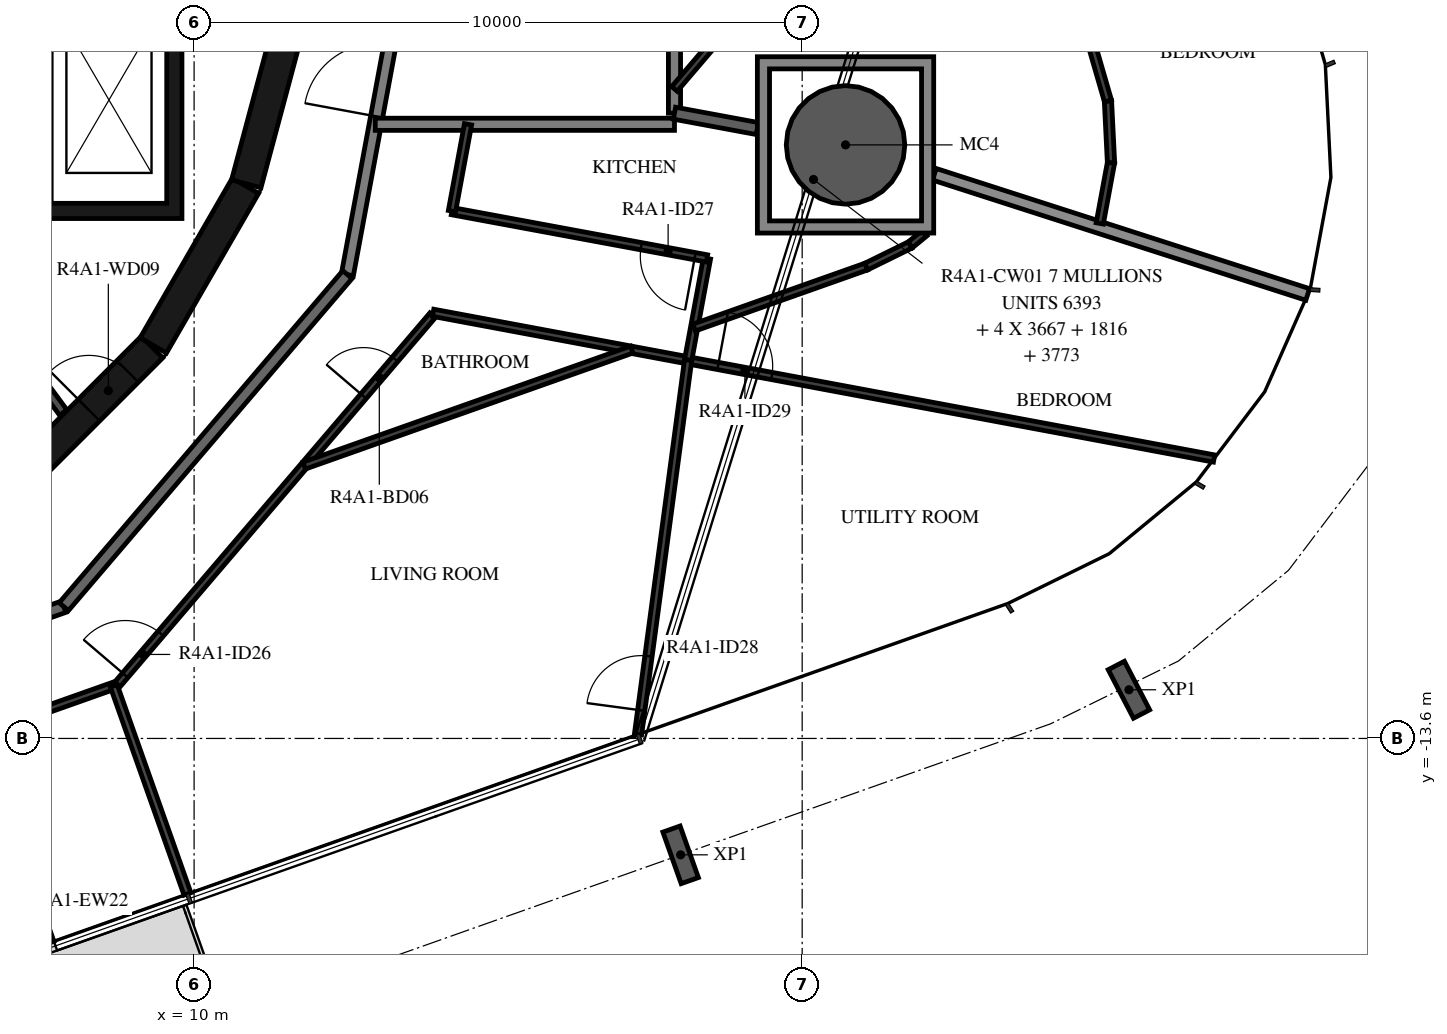
"""IFC4 building model, lengths in metres.
Left out: names, types, materials, properties, quantities, classifications, styles, units other than length and angle.
Written with IfcOpenShell. Run it as: python <this file> out.ifc"""

import sys

from ifc_helpers import new_model, si_unit, direction, frame, frame_2d, origin, origin_2d, place, context, subcontext, project, spatial, polyline, rectangle, hollow_circle, i_section, outline, extrude, element, fill, save


model = new_model("IFC4")
c1 = context("Model", 3, precision=1e-05, world=origin(), true_north=direction((0.0, 1.0)))
c2 = subcontext(c1, "Body", "Model", "MODEL_VIEW")
j1 = project(units=[si_unit("LENGTHUNIT", "METRE"), si_unit("PLANEANGLEUNIT", "RADIAN")], contexts=[c1])
p1 = place(None, origin())
s1 = spatial("IfcSite", under=j1, at=p1, CompositionType="ELEMENT")
p2 = place(p1, origin())
s2 = spatial("IfcBuilding", under=s1, at=p2, CompositionType="ELEMENT")
p3 = place(p2, frame((0.0, 0.0, 155.2)))
s3 = spatial("IfcBuildingStorey", under=s2, at=p3, CompositionType="ELEMENT", Elevation=155.2)
p4 = place(p3, frame((20.713, -3.839, -0.38), z_axis=(0.0, 0.0, 1.0), x_axis=(1.0, 0.0, 0.0)))
e1 = element("IfcColumn", 1, at=p4, inside=s3, PredefinedType="COLUMN", context=c2, shape_type="SweptSolid", body=[
    extrude(hollow_circle(Radius=0.975, WallThickness=0.045, at=origin_2d()), origin(), (0.0, 0.0, 1.0), 3.5),
])
for number, where, z_axis, x_axis in (
    (2, (18.001, -15.514, -0.38), (0.0, 0.0, 1.0), (-0.943, -0.334, 0.0)),
    (3, (25.374, -12.799, -0.38), (0.0, 0.0, 1.0), (-0.887, -0.461, 0.0)),
):
    element("IfcColumn", number, at=place(p3, frame(where, z_axis=z_axis, x_axis=x_axis)), inside=s3, PredefinedType="COLUMN", context=c2, shape_type="SweptSolid", body=[
        extrude(i_section(OverallWidth=0.3, OverallDepth=0.9, WebThickness=0.019, FlangeThickness=0.035, FilletRadius=0.03, at=origin_2d()), origin(), (0.0, 0.0, 1.0), 3.5),
    ])
p5 = place(p3, frame((4.652, -17.929, 0.0), z_axis=(0.0, 0.0, 1.0), x_axis=(0.942620722428, 0.333865502335, 0.0)))
e4 = element("IfcWall", 4, at=p5, inside=s3, PredefinedType="STANDARD", context=c2, shape_type="SweptSolid", body=[
    extrude(rectangle(XDim=3.2, YDim=0.16, at=frame_2d((1.6, 0.0))), origin(), (0.0, 0.0, 1.0), 3.12),
])
p6 = place(p5, frame((0.4, 0.0, 0.0)))
e5 = element("IfcOpeningElement", 5, at=p6, cuts=e4, PredefinedType="OPENING", context=c2, shape_type="SweptSolid", body=[
    extrude(rectangle(XDim=2.4, YDim=2.4, at=frame_2d((1.2, 1.2))), frame((0.0, 0.09, 0.0), z_axis=(0.0, -1.0, 0.0), x_axis=(1.0, 0.0, 0.0)), (0.0, 0.0, 1.0), 0.18),
])
p7 = place(p3, frame((7.164, -9.308, 0.0), z_axis=(0.0, 0.0, 1.0), x_axis=(0.707106781187, 0.707106781187, 0.0)))
e6 = element("IfcWall", 6, at=p7, inside=s3, PredefinedType="SHEAR", context=c2, shape_type="SweptSolid", body=[
    extrude(rectangle(XDim=3.032, YDim=0.5, at=frame_2d((1.516, 0.0))), origin(), (0.0, 0.0, 1.0), 3.12),
])
p8 = place(p7, frame((1.566, 0.0, 0.0)))
e7 = element("IfcOpeningElement", 7, at=p8, cuts=e6, PredefinedType="OPENING", context=c2, shape_type="SweptSolid", body=[
    extrude(rectangle(XDim=0.9, YDim=2.1, at=frame_2d((0.45, 1.05))), frame((0.0, 0.26, 0.0), z_axis=(0.0, -1.0, 0.0), x_axis=(1.0, 0.0, 0.0)), (0.0, 0.0, 1.0), 0.52),
])
for number, where, z_axis, x_axis in (
    (8, (9.329, -7.137, 0.0), (0.0, 0.0, 1.0), (0.5, 0.866, 0.0)),
    (9, (10.858, -4.479, 0.0), (0.0, 0.0, 1.0), (0.259, 0.966, 0.0)),
):
    element("IfcWall", number, at=place(p3, frame(where, z_axis=z_axis, x_axis=x_axis)), inside=s3, PredefinedType="SHEAR", context=c2, shape_type="SweptSolid", body=[
        extrude(rectangle(XDim=3.033, YDim=0.5, at=frame_2d((1.516, 0.0))), origin(), (0.0, 0.0, 1.0), 3.12),
    ])
p9 = place(p3, origin())
e10 = element("IfcWall", 10, at=p9, inside=s3, PredefinedType="SHEAR", context=c2, shape_type="SweptSolid", body=[
    extrude(outline(polyline([(9.8, -5.05), (9.8, -4.8), (9.8, -1.9), (9.55, -1.9), (9.55, -4.8), (7.65, -4.8), (7.65, -1.9), (7.4, -1.9), (7.4, -4.8), (5.5, -4.8), (5.5, -1.9), (5.25, -1.9), (5.25, -4.8), (3.35, -4.8), (3.35, -1.9), (3.1, -1.9), (3.1, -4.8), (1.2, -4.8), (1.2, -1.9), (0.95, -1.9), (0.95, -4.8), (-0.95, -4.8), (-0.95, -1.9), (-1.2, -1.9), (-1.2, -4.8), (-3.1, -4.8), (-3.1, -1.9), (-3.35, -1.9), (-3.35, -4.8), (-5.25, -4.8), (-5.25, -1.9), (-5.5, -1.9), (-5.5, -4.8), (-7.4, -4.8), (-7.4, -1.9), (-7.65, -1.9), (-7.65, -4.8), (-9.55, -4.8), (-9.55, -1.9), (-9.8, -1.9), (-9.8, -4.8), (-9.8, -5.05), (9.8, -5.05)])), origin(), (0.0, 0.0, 1.0), 3.12),
])
p10 = place(p3, frame((5.528, -5.098, 0.0), z_axis=(0.0, 0.0, 1.0), x_axis=(0.594034318069, -0.804439698769, 0.0)))
e11 = element("IfcWall", 11, at=p10, inside=s3, PredefinedType="PARTITIONING", context=c2, shape_type="SweptSolid", body=[
    extrude(rectangle(XDim=3.907, YDim=0.15, at=frame_2d((1.953, 0.0))), origin(), (0.0, 0.0, 1.0), 3.12),
])
p11 = place(p3, frame((12.521, -5.972, 0.0), z_axis=(0.0, 0.0, 1.0), x_axis=(0.182244189886, 0.983253301674, 0.0)))
e12 = element("IfcWall", 12, at=p11, inside=s3, PredefinedType="STANDARD", context=c2, shape_type="SweptSolid", body=[
    extrude(rectangle(XDim=4.176, YDim=0.2, at=frame_2d((2.088, 0.0))), origin(), (0.0, 0.0, 1.0), 3.12),
])
p12 = place(p11, frame((2.645, 0.0, 0.0)))
e13 = element("IfcOpeningElement", 13, at=p12, cuts=e12, PredefinedType="OPENING", context=c2, shape_type="SweptSolid", body=[
    extrude(rectangle(XDim=1.2, YDim=2.1, at=frame_2d((0.6, 1.05))), frame((0.0, 0.11, 0.0), z_axis=(0.0, -1.0, 0.0), x_axis=(1.0, 0.0, 0.0)), (0.0, 0.0, 1.0), 0.22),
])
p13 = place(p3, frame((1.088, -13.83, 0.0), z_axis=(0.0, 0.0, 1.0), x_axis=(0.942648397945, 0.333787354241, 0.0)))
e14 = element("IfcWall", 14, at=p13, inside=s3, PredefinedType="STANDARD", context=c2, shape_type="SweptSolid", body=[
    extrude(rectangle(XDim=7.181, YDim=0.2, at=frame_2d((3.591, 0.0))), origin(), (0.0, 0.0, 1.0), 3.12),
])
p14 = place(p13, frame((0.2, 0.0, 0.0)))
e15 = element("IfcOpeningElement", 15, at=p14, cuts=e14, PredefinedType="OPENING", context=c2, shape_type="SweptSolid", body=[
    extrude(rectangle(XDim=1.0, YDim=2.1, at=frame_2d((0.5, 1.05))), frame((0.0, 0.11, 0.0), z_axis=(0.0, -1.0, 0.0), x_axis=(1.0, 0.0, 0.0)), (0.0, 0.0, 1.0), 0.22),
])
p15 = place(p3, frame((7.858, -11.433, 0.0), z_axis=(0.0, 0.0, 1.0), x_axis=(0.649440801937, 0.760412154545, 0.0)))
e16 = element("IfcWall", 16, at=p15, inside=s3, PredefinedType="STANDARD", context=c2, shape_type="SweptSolid", body=[
    extrude(rectangle(XDim=7.181, YDim=0.2, at=frame_2d((3.59, 0.0))), origin(), (0.0, 0.0, 1.0), 3.12),
])
p16 = place(p3, frame((17.9, -3.318, 0.0), z_axis=(0.0, 0.0, 1.0), x_axis=(0.0, 1.0, 0.0)))
e17 = element("IfcWall", 17, at=p16, inside=s3, PredefinedType="STANDARD", context=c2, shape_type="SweptSolid", body=[
    extrude(rectangle(XDim=6.818, YDim=0.2, at=frame_2d((3.409, 0.0))), origin(), (0.0, 0.0, 1.0), 3.12),
])
p17 = place(p3, frame((12.979, -3.5, 0.0), z_axis=(0.0, 0.0, 1.0), x_axis=(1.0, 0.0, 0.0)))
e18 = element("IfcWall", 18, at=p17, inside=s3, PredefinedType="STANDARD", context=c2, shape_type="SweptSolid", body=[
    extrude(rectangle(XDim=4.92, YDim=0.2, at=frame_2d((2.46, 0.0))), origin(), (0.0, 0.0, 1.0), 3.12),
])
p18 = place(p3, frame((22.173, -4.322, 0.0), z_axis=(0.0, 0.0, 1.0), x_axis=(0.951906405572, -0.306388960362, 0.0)))
e19 = element("IfcWall", 19, at=p18, inside=s3, PredefinedType="STANDARD", context=c2, shape_type="SweptSolid", body=[
    extrude(rectangle(XDim=6.45, YDim=0.2, at=frame_2d((3.225, 0.0))), origin(), (0.0, 0.0, 1.0), 2.73),
])
p19 = place(p3, frame((17.9, -3.318, 0.0), z_axis=(0.0, 0.0, 1.0), x_axis=(0.983252800712, -0.182246892682, 0.0)))
e20 = element("IfcWall", 20, at=p19, inside=s3, PredefinedType="STANDARD", context=c2, shape_type="SweptSolid", body=[
    extrude(rectangle(XDim=1.386, YDim=0.2, at=frame_2d((0.693, 0.0))), origin(), (0.0, 0.0, 1.0), 3.12),
])
p20 = place(p3, frame((17.9, -2.918, 0.0), z_axis=(0.0, 0.0, 1.0), x_axis=(0.649469887983, 0.760387312232, 0.0)))
e21 = element("IfcWall", 21, at=p20, inside=s3, PredefinedType="PARTITIONING", context=c2, shape_type="SweptSolid", body=[
    extrude(rectangle(XDim=5.527, YDim=0.12, at=frame_2d((2.763, 0.0))), origin(), (0.0, 0.0, 1.0), 3.12),
])
p21 = place(p20, frame((1.7, 0.0, 0.0)))
e22 = element("IfcOpeningElement", 22, at=p21, cuts=e21, PredefinedType="OPENING", context=c2, shape_type="SweptSolid", body=[
    extrude(rectangle(XDim=0.9, YDim=2.1, at=frame_2d((0.45, 1.05))), frame((0.0, 0.07, 0.0), z_axis=(0.0, -1.0, 0.0), x_axis=(1.0, 0.0, 0.0)), (0.0, 0.0, 1.0), 0.14),
])
for number, where, z_axis, x_axis in (
    (23, (24.894, -5.131, 0.0), (0.0, 0.0, 1.0), (0.182, 0.983, 0.0)),
    (24, (25.079, -4.132, 0.0), (0.0, 0.0, 1.0), (-0.049, 0.999, 0.0)),
):
    element("IfcWall", number, at=place(p3, frame(where, z_axis=z_axis, x_axis=x_axis)), inside=s3, PredefinedType="PARTITIONING", context=c2, shape_type="SweptSolid", body=[
        extrude(rectangle(XDim=1.016, YDim=0.12, at=frame_2d((0.508, 0.0))), origin(), (0.0, 0.0, 1.0), 3.12),
    ])
p22 = place(p3, frame((25.029, -3.117, 0.0), z_axis=(0.0, 0.0, 1.0), x_axis=(-0.278559922069, 0.96041885124, 0.0)))
e25 = element("IfcWall", 25, at=p22, inside=s3, PredefinedType="PARTITIONING", context=c2, shape_type="SweptSolid", body=[
    extrude(rectangle(XDim=1.016, YDim=0.12, at=frame_2d((0.508, 0.0))), origin(), (0.0, 0.0, 1.0), 3.12),
])
p23 = place(p3, frame((1.269, -15.357, 0.0), z_axis=(0.0, 0.0, 1.0), x_axis=(0.942639442898, 0.333812643101, 0.0)))
e26 = element("IfcWall", 26, at=p23, inside=s3, PredefinedType="PARTITIONING", context=c2, shape_type="SweptSolid", body=[
    extrude(rectangle(XDim=7.86, YDim=0.12, at=frame_2d((3.93, 0.0))), origin(), (0.0, 0.0, 1.0), 3.12),
])
p24 = place(p23, frame((0.2, 0.0, 0.0)))
e27 = element("IfcOpeningElement", 27, at=p24, cuts=e26, PredefinedType="OPENING", context=c2, shape_type="SweptSolid", body=[
    extrude(rectangle(XDim=0.9, YDim=2.1, at=frame_2d((0.45, 1.05))), frame((0.0, 0.07, 0.0), z_axis=(0.0, -1.0, 0.0), x_axis=(1.0, 0.0, 0.0)), (0.0, 0.0, 1.0), 0.14),
])
p25 = place(p3, frame((8.737, -12.713, 0.0), z_axis=(0.0, 0.0, 1.0), x_axis=(0.649430604754, 0.760420863476, 0.0)))
e28 = element("IfcWall", 28, at=p25, inside=s3, PredefinedType="PARTITIONING", context=c2, shape_type="SweptSolid", body=[
    extrude(rectangle(XDim=7.985, YDim=0.12, at=frame_2d((3.992, 0.0))), origin(), (0.0, 0.0, 1.0), 3.12),
])
p26 = place(p25, frame((0.2, 0.0, 0.0)))
e29 = element("IfcOpeningElement", 29, at=p26, cuts=e28, PredefinedType="OPENING", context=c2, shape_type="SweptSolid", body=[
    extrude(rectangle(XDim=0.9, YDim=2.1, at=frame_2d((0.45, 1.05))), frame((0.0, 0.07, 0.0), z_axis=(0.0, -1.0, 0.0), x_axis=(1.0, 0.0, 0.0)), (0.0, 0.0, 1.0), 0.14),
])
p27 = place(p25, frame((6.234, 0.0, 0.0)))
e30 = element("IfcOpeningElement", 30, at=p27, cuts=e28, PredefinedType="OPENING", context=c2, shape_type="SweptSolid", body=[
    extrude(rectangle(XDim=0.8, YDim=2.1, at=frame_2d((0.4, 1.05))), frame((0.0, 0.07, 0.0), z_axis=(0.0, -1.0, 0.0), x_axis=(1.0, 0.0, 0.0)), (0.0, 0.0, 1.0), 0.14),
])
p28 = place(p3, frame((13.93, -6.6, 0.0), z_axis=(0.0, 0.0, 1.0), x_axis=(0.983034896283, -0.183418626887, 0.0)))
e31 = element("IfcWall", 31, at=p28, inside=s3, PredefinedType="PARTITIONING", context=c2, shape_type="SweptSolid", body=[
    extrude(rectangle(XDim=13.066, YDim=0.12, at=frame_2d((6.533, 0.0))), origin(), (0.0, 0.0, 1.0), 3.12),
])
p29 = place(p28, frame((4.766, 0.0, 0.0)))
e32 = element("IfcOpeningElement", 32, at=p29, cuts=e31, PredefinedType="OPENING", context=c2, shape_type="SweptSolid", body=[
    extrude(rectangle(XDim=0.9, YDim=2.1, at=frame_2d((0.45, 1.05))), frame((0.0, 0.07, 0.0), z_axis=(0.0, -1.0, 0.0), x_axis=(1.0, 0.0, 0.0)), (0.0, 0.0, 1.0), 0.14),
])
p30 = place(p3, frame((18.125, -7.377, 0.0), z_axis=(0.0, 0.0, 1.0), x_axis=(0.182233242958, 0.983255330604, 0.0)))
e33 = element("IfcWall", 33, at=p30, inside=s3, PredefinedType="PARTITIONING", context=c2, shape_type="SweptSolid", body=[
    extrude(rectangle(XDim=1.7, YDim=0.12, at=frame_2d((0.85, 0.0))), origin(), (0.0, 0.0, 1.0), 3.12),
])
p31 = place(p3, frame((18.435, -5.706, 0.0), z_axis=(0.0, 0.0, 1.0), x_axis=(-0.983256187302, 0.18222862051, 0.0)))
e34 = element("IfcWall", 34, at=p31, inside=s3, PredefinedType="PARTITIONING", context=c2, shape_type="SweptSolid", body=[
    extrude(rectangle(XDim=4.266, YDim=0.12, at=frame_2d((2.133, 0.0))), origin(), (0.0, 0.0, 1.0), 3.12),
])
p32 = place(p31, frame((0.2, 0.0, 0.0)))
e35 = element("IfcOpeningElement", 35, at=p32, cuts=e34, PredefinedType="OPENING", context=c2, shape_type="SweptSolid", body=[
    extrude(rectangle(XDim=0.9, YDim=2.1, at=frame_2d((0.45, 1.05))), frame((0.0, 0.07, 0.0), z_axis=(0.0, -1.0, 0.0), x_axis=(1.0, 0.0, 0.0)), (0.0, 0.0, 1.0), 0.14),
])
p33 = place(p3, frame((14.24, -4.928, 0.0), z_axis=(0.0, 0.0, 1.0), x_axis=(0.182329957282, 0.983237400976, 0.0)))
e36 = element("IfcWall", 36, at=p33, inside=s3, PredefinedType="PARTITIONING", context=c2, shape_type="SweptSolid", body=[
    extrude(rectangle(XDim=1.453, YDim=0.12, at=frame_2d((0.727, 0.0))), origin(), (0.0, 0.0, 1.0), 3.12),
])
p34 = place(p3, frame((9.891, -16.158, 0.0), z_axis=(0.0, 0.0, 1.0), x_axis=(-0.33385336213, 0.942625022262, 0.0)))
e37 = element("IfcWall", 37, at=p34, inside=s3, PredefinedType="PARTITIONING", context=c2, shape_type="SweptSolid", body=[
    extrude(rectangle(XDim=3.633, YDim=0.12, at=frame_2d((1.816, 0.0))), origin(), (0.0, 0.0, 1.0), 2.73),
])
p35 = place(p3, frame((17.198, -7.206, 0.0), z_axis=(0.0, 0.0, 1.0), x_axis=(-0.942639551003, -0.333812337826, 0.0)))
e38 = element("IfcWall", 38, at=p35, inside=s3, PredefinedType="PARTITIONING", context=c2, shape_type="SweptSolid", body=[
    extrude(rectangle(XDim=5.713, YDim=0.12, at=frame_2d((2.857, 0.0))), origin(), (0.0, 0.0, 1.0), 3.12),
])
p36 = place(p3, frame((17.3, -13.534, 0.0), z_axis=(0.0, 0.0, 1.0), x_axis=(0.132727504799, 0.991152566192, 0.0)))
e39 = element("IfcWall", 39, at=p36, inside=s3, PredefinedType="PARTITIONING", context=c2, shape_type="SweptSolid", body=[
    extrude(rectangle(XDim=6.212, YDim=0.12, at=frame_2d((3.106, 0.0))), origin(), (0.0, 0.0, 1.0), 3.12),
])
p37 = place(p36, frame((0.4, 0.0, 0.0)))
e40 = element("IfcOpeningElement", 40, at=p37, cuts=e39, PredefinedType="OPENING", context=c2, shape_type="SweptSolid", body=[
    extrude(rectangle(XDim=0.9, YDim=2.1, at=frame_2d((0.45, 1.05))), frame((0.0, 0.07, 0.0), z_axis=(0.0, -1.0, 0.0), x_axis=(1.0, 0.0, 0.0)), (0.0, 0.0, 1.0), 0.14),
])
p38 = place(p3, frame((22.013, -5.289, 0.0), z_axis=(0.0, 0.0, 1.0), x_axis=(-0.771907381926, -0.635735002755, 0.0)))
e41 = element("IfcWall", 41, at=p38, inside=s3, PredefinedType="PARTITIONING", context=c2, shape_type="SweptSolid", body=[
    extrude(rectangle(XDim=0.308, YDim=0.12, at=frame_2d((0.154, 0.0))), origin(), (0.0, 0.0, 1.0), 3.12),
])
p39 = place(p3, frame((21.775, -5.485, 0.0), z_axis=(0.0, 0.0, 1.0), x_axis=(-0.897493373385, -0.441027940986, 0.0)))
e42 = element("IfcWall", 42, at=p39, inside=s3, PredefinedType="PARTITIONING", context=c2, shape_type="SweptSolid", body=[
    extrude(rectangle(XDim=0.807, YDim=0.12, at=frame_2d((0.403, 0.0))), origin(), (0.0, 0.0, 1.0), 3.12),
])
p40 = place(p3, frame((21.052, -5.841, 0.0), z_axis=(0.0, 0.0, 1.0), x_axis=(-0.94262615799, -0.33385015542, 0.0)))
e43 = element("IfcWall", 43, at=p40, inside=s3, PredefinedType="PARTITIONING", context=c2, shape_type="SweptSolid", body=[
    extrude(rectangle(XDim=3.0, YDim=0.12, at=frame_2d((1.5, 0.0))), origin(), (0.0, 0.0, 1.0), 3.12),
])
p41 = place(p3, origin())
e44 = element("IfcWall", 44, at=p41, inside=s3, PredefinedType="STANDARD", context=c2, shape_type="SweptSolid", body=[
    extrude(outline(polyline([(22.163, -2.389), (22.163, -5.289), (19.263, -5.289), (19.263, -2.389), (22.163, -2.389)]), holes=[polyline([(19.463, -5.089), (21.963, -5.089), (21.963, -2.589), (19.463, -2.589), (19.463, -5.089)])]), origin(), (0.0, 0.0, 1.0), 3.12),
])
p42 = place(p8, origin())
e45 = element("IfcDoor", 45, at=p42, inside=s3, OperationType="SINGLE_SWING_LEFT", PredefinedType="DOOR", context=c2, shape_type="SweptSolid", body=[
    extrude(rectangle(XDim=0.9, YDim=2.1, at=frame_2d((0.45, 1.05))), frame((0.0, 0.025, 0.0), z_axis=(0.0, -1.0, 0.0), x_axis=(1.0, 0.0, 0.0)), (0.0, 0.0, 1.0), 0.05),
])
fill(e7, e45)
p43 = place(p26, origin())
e46 = element("IfcDoor", 46, at=p43, inside=s3, OperationType="SINGLE_SWING_RIGHT", PredefinedType="DOOR", context=c2, shape_type="SweptSolid", body=[
    extrude(rectangle(XDim=0.9, YDim=2.1, at=frame_2d((0.45, 1.05))), frame((0.0, 0.025, 0.0), z_axis=(0.0, -1.0, 0.0), x_axis=(1.0, 0.0, 0.0)), (0.0, 0.0, 1.0), 0.05),
])
fill(e29, e46)
p44 = place(p27, origin())
e47 = element("IfcDoor", 47, at=p44, inside=s3, OperationType="SINGLE_SWING_RIGHT", PredefinedType="DOOR", context=c2, shape_type="SweptSolid", body=[
    extrude(rectangle(XDim=0.8, YDim=2.1, at=frame_2d((0.4, 1.05))), frame((0.0, 0.025, 0.0), z_axis=(0.0, -1.0, 0.0), x_axis=(1.0, 0.0, 0.0)), (0.0, 0.0, 1.0), 0.05),
])
fill(e30, e47)
p45 = place(p32, origin())
e48 = element("IfcDoor", 48, at=p45, inside=s3, OperationType="SINGLE_SWING_LEFT", PredefinedType="DOOR", context=c2, shape_type="SweptSolid", body=[
    extrude(rectangle(XDim=0.9, YDim=2.1, at=frame_2d((0.45, 1.05))), frame((0.0, 0.025, 0.0), z_axis=(0.0, -1.0, 0.0), x_axis=(1.0, 0.0, 0.0)), (0.0, 0.0, 1.0), 0.05),
])
fill(e35, e48)
p46 = place(p37, origin())
e49 = element("IfcDoor", 49, at=p46, inside=s3, OperationType="SINGLE_SWING_RIGHT", PredefinedType="DOOR", context=c2, shape_type="SweptSolid", body=[
    extrude(rectangle(XDim=0.9, YDim=2.1, at=frame_2d((0.45, 1.05))), frame((0.0, 0.025, 0.0), z_axis=(0.0, -1.0, 0.0), x_axis=(1.0, 0.0, 0.0)), (0.0, 0.0, 1.0), 0.05),
])
fill(e40, e49)
p47 = place(p29, origin())
e50 = element("IfcDoor", 50, at=p47, inside=s3, OperationType="SINGLE_SWING_RIGHT", PredefinedType="DOOR", context=c2, shape_type="SweptSolid", body=[
    extrude(rectangle(XDim=0.9, YDim=2.1, at=frame_2d((0.45, 1.05))), frame((0.0, 0.025, 0.0), z_axis=(0.0, -1.0, 0.0), x_axis=(1.0, 0.0, 0.0)), (0.0, 0.0, 1.0), 0.05),
])
fill(e32, e50)
p48 = place(p12, origin())
e51 = element("IfcDoor", 51, at=p48, inside=s3, OperationType="DOUBLE_DOOR_SINGLE_SWING", PredefinedType="DOOR", context=c2, shape_type="SweptSolid", body=[
    extrude(rectangle(XDim=1.2, YDim=2.1, at=frame_2d((0.6, 1.05))), frame((0.0, 0.025, 0.0), z_axis=(0.0, -1.0, 0.0), x_axis=(1.0, 0.0, 0.0)), (0.0, 0.0, 1.0), 0.05),
])
fill(e13, e51)
save(model, sys.argv[1])
